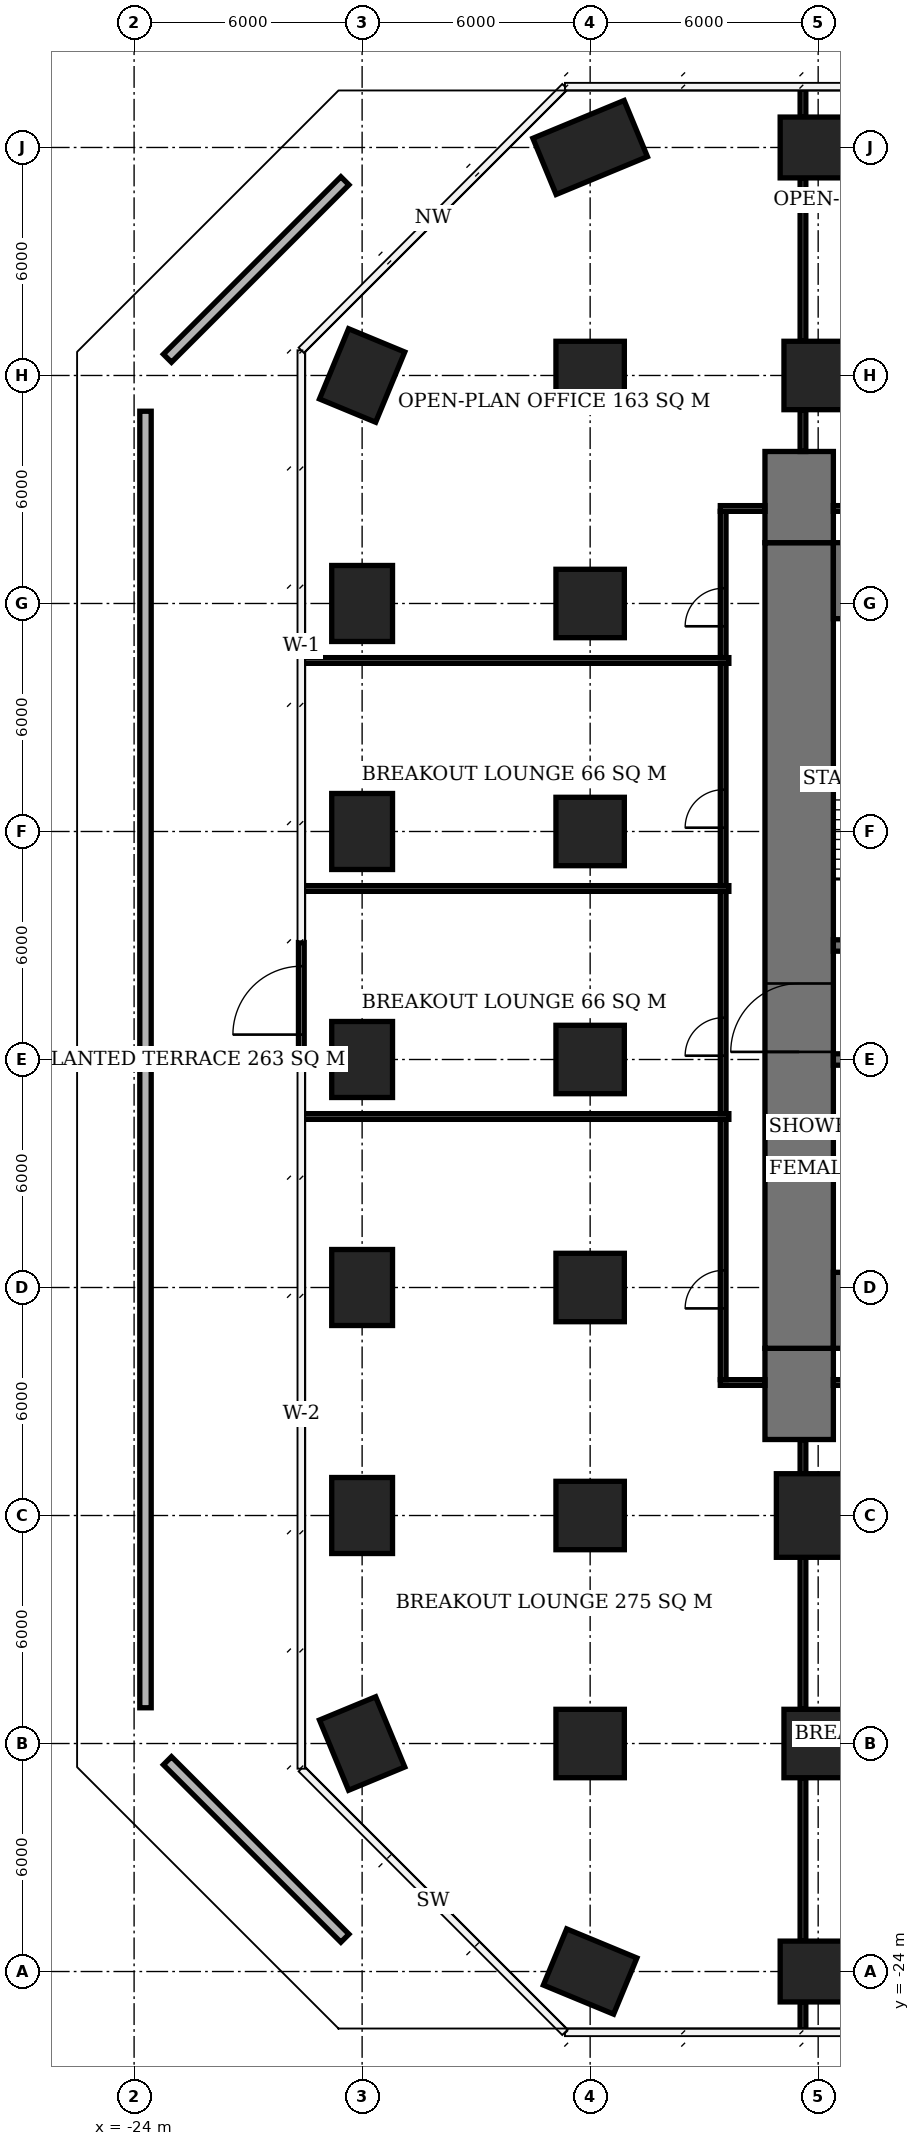
"""IFC4 building model, lengths in metres.
Left out: names, types, materials, properties, quantities, classifications, styles, units other than length and angle.
Written with IfcOpenShell. Run it as: python <this file> out.ifc"""

import sys

from ifc_helpers import new_model, si_unit, direction, frame, frame_2d, origin, origin_2d, place, context, subcontext, project, spatial, rectangle, extrude, element, fill, save


model = new_model("IFC4")
c1 = context("Model", 3, precision=1e-05, world=origin(), true_north=direction((0.0, 1.0)))
c2 = subcontext(c1, "Body", "Model", "MODEL_VIEW")
j1 = project(units=[si_unit("LENGTHUNIT", "METRE"), si_unit("PLANEANGLEUNIT", "RADIAN")], contexts=[c1])
p1 = place(None, origin())
s1 = spatial("IfcSite", under=j1, at=p1, CompositionType="ELEMENT")
p2 = place(p1, origin())
s2 = spatial("IfcBuilding", under=s1, at=p2, CompositionType="ELEMENT")
p3 = place(p2, frame((0.0, 0.0, 41.6)))
s3 = spatial("IfcBuildingStorey", under=s2, at=p3, CompositionType="ELEMENT", Elevation=41.6)
for number, where, z_axis, x_axis in (
    (1, (-18.0, -18.0, 0.0), (0.0, 0.0, 1.0), (-0.383, 0.924, 0.0)),
    (2, (-18.0, -12.0, 0.0), (0.0, 0.0, 1.0), (0.0, 1.0, 0.0)),
    (3, (-18.0, -6.0, 0.0), (0.0, 0.0, 1.0), (0.0, 1.0, 0.0)),
    (4, (-18.0, 0.0, 0.0), (0.0, 0.0, 1.0), (0.0, 1.0, 0.0)),
    (5, (-18.0, 6.0, 0.0), (0.0, 0.0, 1.0), (0.0, 1.0, 0.0)),
    (6, (-18.0, 12.0, 0.0), (0.0, 0.0, 1.0), (0.0, 1.0, 0.0)),
    (7, (-18.0, 18.0, 0.0), (0.0, 0.0, 1.0), (0.383, 0.924, 0.0)),
    (8, (-12.0, -24.0, 0.0), (0.0, 0.0, 1.0), (-0.924, 0.383, 0.0)),
):
    element("IfcColumn", number, at=place(p3, frame(where, z_axis=z_axis, x_axis=x_axis)), inside=s3, PredefinedType="COLUMN", context=c2, shape_type="SweptSolid", body=[
        extrude(rectangle(XDim=2.0, YDim=1.6, at=origin_2d()), origin(), (0.0, 0.0, 1.0), 3.9),
    ])
for number, where, z_axis, x_axis in (
    (9, (-12.0, -18.0, 0.0), (0.0, 0.0, 1.0), (1.0, 0.0, 0.0)),
    (10, (-12.0, -12.0, 0.0), (0.0, 0.0, 1.0), (1.0, 0.0, 0.0)),
    (11, (-12.0, -6.0, 0.0), (0.0, 0.0, 1.0), (1.0, 0.0, 0.0)),
    (12, (-12.0, 0.0, 0.0), (0.0, 0.0, 1.0), (1.0, 0.0, 0.0)),
    (13, (-12.0, 6.0, 0.0), (0.0, 0.0, 1.0), (1.0, 0.0, 0.0)),
    (14, (-12.0, 12.0, 0.0), (0.0, 0.0, 1.0), (1.0, 0.0, 0.0)),
    (15, (-12.0, 18.0, 0.0), (0.0, 0.0, 1.0), (1.0, 0.0, 0.0)),
):
    element("IfcColumn", number, at=place(p3, frame(where, z_axis=z_axis, x_axis=x_axis)), inside=s3, PredefinedType="COLUMN", context=c2, shape_type="SweptSolid", body=[
        extrude(rectangle(XDim=1.8, YDim=1.8, at=origin_2d()), origin(), (0.0, 0.0, 1.0), 3.9),
    ])
p4 = place(p3, frame((-12.0, 24.0, 0.0), z_axis=(0.0, 0.0, 1.0), x_axis=(0.923879532511, 0.382683432365, 0.0)))
e16 = element("IfcColumn", 16, at=p4, inside=s3, PredefinedType="COLUMN", context=c2, shape_type="SweptSolid", body=[
    extrude(rectangle(XDim=2.6, YDim=1.6, at=origin_2d()), origin(), (0.0, 0.0, 1.0), 3.9),
])
p5 = place(p3, frame((-6.0, -24.0, 0.0), z_axis=(0.0, 0.0, 1.0), x_axis=(1.0, 0.0, 0.0)))
e17 = element("IfcColumn", 17, at=p5, inside=s3, PredefinedType="COLUMN", context=c2, shape_type="SweptSolid", body=[
    extrude(rectangle(XDim=2.0, YDim=1.6, at=origin_2d()), origin(), (0.0, 0.0, 1.0), 3.9),
])
p6 = place(p3, frame((-6.0, -18.0, 0.0), z_axis=(0.0, 0.0, 1.0), x_axis=(1.0, 0.0, 0.0)))
e18 = element("IfcColumn", 18, at=p6, inside=s3, PredefinedType="COLUMN", context=c2, shape_type="SweptSolid", body=[
    extrude(rectangle(XDim=1.8, YDim=1.8, at=origin_2d()), origin(), (0.0, 0.0, 1.0), 3.9),
])
p7 = place(p3, frame((-6.0, -12.0, 0.0), z_axis=(0.0, 0.0, 1.0), x_axis=(1.0, 0.0, 0.0)))
e19 = element("IfcColumn", 19, at=p7, inside=s3, PredefinedType="COLUMN", context=c2, shape_type="SweptSolid", body=[
    extrude(rectangle(XDim=2.2, YDim=2.2, at=origin_2d()), origin(), (0.0, 0.0, 1.0), 3.9),
])
p8 = place(p3, frame((-6.0, 18.0, 0.0), z_axis=(0.0, 0.0, 1.0), x_axis=(1.0, 0.0, 0.0)))
e20 = element("IfcColumn", 20, at=p8, inside=s3, PredefinedType="COLUMN", context=c2, shape_type="SweptSolid", body=[
    extrude(rectangle(XDim=1.8, YDim=1.8, at=origin_2d()), origin(), (0.0, 0.0, 1.0), 3.9),
])
p9 = place(p3, frame((-6.0, 24.0, 0.0), z_axis=(0.0, 0.0, 1.0), x_axis=(1.0, 0.0, 0.0)))
e21 = element("IfcColumn", 21, at=p9, inside=s3, PredefinedType="COLUMN", context=c2, shape_type="SweptSolid", body=[
    extrude(rectangle(XDim=2.0, YDim=1.6, at=origin_2d()), origin(), (0.0, 0.0, 1.0), 3.9),
])
for number, where, z_axis, x_axis in (
    (22, (-5.6, -6.6, 0.0), (0.0, 0.0, 1.0), (1.0, 0.0, 0.0)),
    (23, (-5.6, 12.6, 0.0), (0.0, 0.0, 1.0), (1.0, 0.0, 0.0)),
):
    element("IfcWall", number, at=place(p3, frame(where, z_axis=z_axis, x_axis=x_axis)), inside=s3, PredefinedType="SHEAR", context=c2, shape_type="SweptSolid", body=[
        extrude(rectangle(XDim=23.2, YDim=2.0, at=frame_2d((11.6, 0.0))), origin(), (0.0, 0.0, 1.0), 3.9),
    ])
p10 = place(p3, frame((-6.5, -7.6, 0.0), z_axis=(0.0, 0.0, 1.0), x_axis=(0.0, 1.0, 0.0)))
e24 = element("IfcWall", 24, at=p10, inside=s3, PredefinedType="SHEAR", context=c2, shape_type="SweptSolid", body=[
    extrude(rectangle(XDim=21.2, YDim=1.8, at=frame_2d((10.6, 0.0))), origin(), (0.0, 0.0, 1.0), 3.9),
])
p11 = place(p10, frame((7.8, 0.0, 0.0)))
e25 = element("IfcOpeningElement", 25, at=p11, cuts=e24, PredefinedType="OPENING", context=c2, shape_type="SweptSolid", body=[
    extrude(rectangle(XDim=1.8, YDim=2.4, at=frame_2d((0.9, 1.2))), frame((0.0, 0.91, 0.0), z_axis=(0.0, -1.0, 0.0), x_axis=(1.0, 0.0, 0.0)), (0.0, 0.0, 1.0), 1.82),
])
for number, where, z_axis, x_axis in (
    (26, (-6.5, -10.0, 0.0), (0.0, 0.0, 1.0), (0.0, 1.0, 0.0)),
    (27, (-6.5, 13.6, 0.0), (0.0, 0.0, 1.0), (0.0, 1.0, 0.0)),
):
    element("IfcWall", number, at=place(p3, frame(where, z_axis=z_axis, x_axis=x_axis)), inside=s3, PredefinedType="SHEAR", context=c2, shape_type="SweptSolid", body=[
        extrude(rectangle(XDim=2.4, YDim=1.8, at=frame_2d((1.2, 0.0))), origin(), (0.0, 0.0, 1.0), 3.9),
    ])
p12 = place(p3, frame((-5.6, 0.0, 0.0), z_axis=(0.0, 0.0, 1.0), x_axis=(1.0, 0.0, 0.0)))
e28 = element("IfcWall", 28, at=p12, inside=s3, PredefinedType="SHEAR", context=c2, shape_type="SweptSolid", body=[
    extrude(rectangle(XDim=17.75, YDim=0.3, at=frame_2d((8.875, 0.0))), origin(), (0.0, 0.0, 1.0), 3.9),
])
p13 = place(p12, frame((0.6, 0.0, 0.0)))
e29 = element("IfcOpeningElement", 29, at=p13, cuts=e28, PredefinedType="OPENING", context=c2, shape_type="SweptSolid", body=[
    extrude(rectangle(XDim=0.9, YDim=2.1, at=frame_2d((0.45, 1.05))), frame((0.0, 0.16, 0.0), z_axis=(0.0, -1.0, 0.0), x_axis=(1.0, 0.0, 0.0)), (0.0, 0.0, 1.0), 0.32),
])
p14 = place(p12, frame((3.7, 0.0, 0.0)))
e30 = element("IfcOpeningElement", 30, at=p14, cuts=e28, PredefinedType="OPENING", context=c2, shape_type="SweptSolid", body=[
    extrude(rectangle(XDim=0.9, YDim=2.1, at=frame_2d((0.45, 1.05))), frame((0.0, 0.16, 0.0), z_axis=(0.0, -1.0, 0.0), x_axis=(1.0, 0.0, 0.0)), (0.0, 0.0, 1.0), 0.32),
])
p15 = place(p3, frame((-5.6, 3.0, 0.0), z_axis=(0.0, 0.0, 1.0), x_axis=(1.0, 0.0, 0.0)))
e31 = element("IfcWall", 31, at=p15, inside=s3, PredefinedType="SHEAR", context=c2, shape_type="SweptSolid", body=[
    extrude(rectangle(XDim=5.45, YDim=0.3, at=frame_2d((2.725, 0.0))), origin(), (0.0, 0.0, 1.0), 3.9),
])
p16 = place(p15, frame((0.4, 0.0, 0.0)))
e32 = element("IfcOpeningElement", 32, at=p16, cuts=e31, PredefinedType="OPENING", context=c2, shape_type="SweptSolid", body=[
    extrude(rectangle(XDim=1.2, YDim=2.1, at=frame_2d((0.6, 1.05))), frame((0.0, 0.16, 0.0), z_axis=(0.0, -1.0, 0.0), x_axis=(1.0, 0.0, 0.0)), (0.0, 0.0, 1.0), 0.32),
])
p17 = place(p15, frame((3.95, 0.0, 0.0)))
e33 = element("IfcOpeningElement", 33, at=p17, cuts=e31, PredefinedType="OPENING", context=c2, shape_type="SweptSolid", body=[
    extrude(rectangle(XDim=0.9, YDim=2.1, at=frame_2d((0.45, 1.05))), frame((0.0, 0.16, 0.0), z_axis=(0.0, -1.0, 0.0), x_axis=(1.0, 0.0, 0.0)), (0.0, 0.0, 1.0), 0.32),
])
p18 = place(p3, frame((-19.6, -0.042, 0.0), z_axis=(0.0, 0.0, 1.0), x_axis=(0.0, 1.0, 0.0)))
e34 = element("IfcWall", 34, at=p18, inside=s3, PredefinedType="USERDEFINED", context=c2, shape_type="SweptSolid", body=[
    extrude(rectangle(XDim=3.12, YDim=0.15, at=frame_2d((1.56, 0.0))), origin(), (0.0, 0.0, 1.0), 3.9),
])
p19 = place(p18, frame((0.698, 0.0, 0.0)))
e35 = element("IfcOpeningElement", 35, at=p19, cuts=e34, PredefinedType="OPENING", context=c2, shape_type="SweptSolid", body=[
    extrude(rectangle(XDim=1.8, YDim=2.4, at=frame_2d((0.9, 1.2))), frame((0.0, 0.085, 0.0), z_axis=(0.0, -1.0, 0.0), x_axis=(1.0, 0.0, 0.0)), (0.0, 0.0, 1.0), 0.17),
])
p20 = place(p3, frame((-18.453, -23.123, 0.0), z_axis=(0.0, 0.0, 1.0), x_axis=(-0.707106781187, 0.707106781187, 0.0)))
e36 = element("IfcWall", 36, at=p20, inside=s3, PredefinedType="USERDEFINED", context=c2, shape_type="SweptSolid", body=[
    extrude(rectangle(XDim=6.604, YDim=0.3, at=frame_2d((3.302, 0.0))), origin(), (0.0, 0.0, 1.0), 0.6),
])
p21 = place(p3, frame((-23.7, -17.059, 0.0), z_axis=(0.0, 0.0, 1.0), x_axis=(0.0, 1.0, 0.0)))
e37 = element("IfcWall", 37, at=p21, inside=s3, PredefinedType="USERDEFINED", context=c2, shape_type="SweptSolid", body=[
    extrude(rectangle(XDim=34.118, YDim=0.3, at=frame_2d((17.059, 0.0))), origin(), (0.0, 0.0, 1.0), 0.6),
])
p22 = place(p3, frame((-23.123, 18.453, 0.0), z_axis=(0.0, 0.0, 1.0), x_axis=(0.707106781187, 0.707106781187, 0.0)))
e38 = element("IfcWall", 38, at=p22, inside=s3, PredefinedType="USERDEFINED", context=c2, shape_type="SweptSolid", body=[
    extrude(rectangle(XDim=6.604, YDim=0.3, at=frame_2d((3.302, 0.0))), origin(), (0.0, 0.0, 1.0), 0.6),
])
for number, where, z_axis, x_axis in (
    (39, (-19.6, -1.5, 0.0), (0.0, 0.0, 1.0), (1.0, 0.0, 0.0)),
    (40, (-19.6, 4.5, 0.0), (0.0, 0.0, 1.0), (1.0, 0.0, 0.0)),
    (41, (-19.6, 10.5, 0.0), (0.0, 0.0, 1.0), (1.0, 0.0, 0.0)),
):
    element("IfcWall", number, at=place(p3, frame(where, z_axis=z_axis, x_axis=x_axis)), inside=s3, PredefinedType="PARTITIONING", context=c2, shape_type="SweptSolid", body=[
        extrude(rectangle(XDim=11.25, YDim=0.15, at=frame_2d((5.625, 0.0))), origin(), (0.0, 0.0, 1.0), 3.65),
    ])
p23 = place(p3, frame((-8.5, -8.425, 0.0), z_axis=(0.0, 0.0, 1.0), x_axis=(0.0, 1.0, 0.0)))
e42 = element("IfcWall", 42, at=p23, inside=s3, PredefinedType="PARTITIONING", context=c2, shape_type="SweptSolid", body=[
    extrude(rectangle(XDim=6.85, YDim=0.15, at=frame_2d((3.425, 0.0))), origin(), (0.0, 0.0, 1.0), 3.65),
])
p24 = place(p23, frame((1.875, 0.0, 0.0)))
e43 = element("IfcOpeningElement", 43, at=p24, cuts=e42, PredefinedType="OPENING", context=c2, shape_type="SweptSolid", body=[
    extrude(rectangle(XDim=1.0, YDim=2.1, at=frame_2d((0.5, 1.05))), frame((0.0, 0.085, 0.0), z_axis=(0.0, -1.0, 0.0), x_axis=(1.0, 0.0, 0.0)), (0.0, 0.0, 1.0), 0.17),
])
p25 = place(p3, frame((-8.575, -8.5, 0.0), z_axis=(0.0, 0.0, 1.0), x_axis=(1.0, 0.0, 0.0)))
e44 = element("IfcWall", 44, at=p25, inside=s3, PredefinedType="PARTITIONING", context=c2, shape_type="SweptSolid", body=[
    extrude(rectangle(XDim=1.175, YDim=0.15, at=frame_2d((0.587, 0.0))), origin(), (0.0, 0.0, 1.0), 3.65),
])
p26 = place(p3, frame((-8.5, -1.425, 0.0), z_axis=(0.0, 0.0, 1.0), x_axis=(0.0, 1.0, 0.0)))
e45 = element("IfcWall", 45, at=p26, inside=s3, PredefinedType="PARTITIONING", context=c2, shape_type="SweptSolid", body=[
    extrude(rectangle(XDim=5.85, YDim=0.15, at=frame_2d((2.925, 0.0))), origin(), (0.0, 0.0, 1.0), 3.65),
])
p27 = place(p26, frame((1.525, 0.0, 0.0)))
e46 = element("IfcOpeningElement", 46, at=p27, cuts=e45, PredefinedType="OPENING", context=c2, shape_type="SweptSolid", body=[
    extrude(rectangle(XDim=1.0, YDim=2.1, at=frame_2d((0.5, 1.05))), frame((0.0, 0.085, 0.0), z_axis=(0.0, -1.0, 0.0), x_axis=(1.0, 0.0, 0.0)), (0.0, 0.0, 1.0), 0.17),
])
p28 = place(p3, frame((-8.5, 4.575, 0.0), z_axis=(0.0, 0.0, 1.0), x_axis=(0.0, 1.0, 0.0)))
e47 = element("IfcWall", 47, at=p28, inside=s3, PredefinedType="PARTITIONING", context=c2, shape_type="SweptSolid", body=[
    extrude(rectangle(XDim=5.85, YDim=0.15, at=frame_2d((2.925, 0.0))), origin(), (0.0, 0.0, 1.0), 3.65),
])
p29 = place(p28, frame((1.525, 0.0, 0.0)))
e48 = element("IfcOpeningElement", 48, at=p29, cuts=e47, PredefinedType="OPENING", context=c2, shape_type="SweptSolid", body=[
    extrude(rectangle(XDim=1.0, YDim=2.1, at=frame_2d((0.5, 1.05))), frame((0.0, 0.085, 0.0), z_axis=(0.0, -1.0, 0.0), x_axis=(1.0, 0.0, 0.0)), (0.0, 0.0, 1.0), 0.17),
])
p30 = place(p3, frame((-8.5, 10.575, 0.0), z_axis=(0.0, 0.0, 1.0), x_axis=(0.0, 1.0, 0.0)))
e49 = element("IfcWall", 49, at=p30, inside=s3, PredefinedType="PARTITIONING", context=c2, shape_type="SweptSolid", body=[
    extrude(rectangle(XDim=3.85, YDim=0.15, at=frame_2d((1.925, 0.0))), origin(), (0.0, 0.0, 1.0), 3.65),
])
p31 = place(p30, frame((0.825, 0.0, 0.0)))
e50 = element("IfcOpeningElement", 50, at=p31, cuts=e49, PredefinedType="OPENING", context=c2, shape_type="SweptSolid", body=[
    extrude(rectangle(XDim=1.0, YDim=2.1, at=frame_2d((0.5, 1.05))), frame((0.0, 0.085, 0.0), z_axis=(0.0, -1.0, 0.0), x_axis=(1.0, 0.0, 0.0)), (0.0, 0.0, 1.0), 0.17),
])
p32 = place(p3, frame((-8.575, 14.5, 0.0), z_axis=(0.0, 0.0, 1.0), x_axis=(1.0, 0.0, 0.0)))
e51 = element("IfcWall", 51, at=p32, inside=s3, PredefinedType="PARTITIONING", context=c2, shape_type="SweptSolid", body=[
    extrude(rectangle(XDim=1.175, YDim=0.15, at=frame_2d((0.587, 0.0))), origin(), (0.0, 0.0, 1.0), 3.65),
])
p33 = place(p3, frame((-6.4, -25.55, 0.0), z_axis=(0.0, 0.0, 1.0), x_axis=(0.0, 1.0, 0.0)))
e52 = element("IfcWall", 52, at=p33, inside=s3, PredefinedType="PARTITIONING", context=c2, shape_type="SweptSolid", body=[
    extrude(rectangle(XDim=0.75, YDim=0.15, at=frame_2d((0.375, 0.0))), origin(), (0.0, 0.0, 1.0), 3.65),
])
p34 = place(p3, frame((-6.4, -23.2, 0.0), z_axis=(0.0, 0.0, 1.0), x_axis=(0.0, 1.0, 0.0)))
e53 = element("IfcWall", 53, at=p34, inside=s3, PredefinedType="PARTITIONING", context=c2, shape_type="SweptSolid", body=[
    extrude(rectangle(XDim=4.3, YDim=0.15, at=frame_2d((2.15, 0.0))), origin(), (0.0, 0.0, 1.0), 3.65),
])
p35 = place(p3, frame((-6.4, -17.1, 0.0), z_axis=(0.0, 0.0, 1.0), x_axis=(0.0, 1.0, 0.0)))
e54 = element("IfcWall", 54, at=p35, inside=s3, PredefinedType="PARTITIONING", context=c2, shape_type="SweptSolid", body=[
    extrude(rectangle(XDim=4.0, YDim=0.15, at=frame_2d((2.0, 0.0))), origin(), (0.0, 0.0, 1.0), 3.65),
])
p36 = place(p3, frame((-6.4, -10.9, 0.0), z_axis=(0.0, 0.0, 1.0), x_axis=(0.0, 1.0, 0.0)))
e55 = element("IfcWall", 55, at=p36, inside=s3, PredefinedType="PARTITIONING", context=c2, shape_type="SweptSolid", body=[
    extrude(rectangle(XDim=0.9, YDim=0.15, at=frame_2d((0.45, 0.0))), origin(), (0.0, 0.0, 1.0), 3.65),
])
p37 = place(p3, frame((-6.4, 16.0, 0.0), z_axis=(0.0, 0.0, 1.0), x_axis=(0.0, 1.0, 0.0)))
e56 = element("IfcWall", 56, at=p37, inside=s3, PredefinedType="PARTITIONING", context=c2, shape_type="SweptSolid", body=[
    extrude(rectangle(XDim=1.1, YDim=0.15, at=frame_2d((0.55, 0.0))), origin(), (0.0, 0.0, 1.0), 3.65),
])
p38 = place(p3, frame((-6.4, 18.9, 0.0), z_axis=(0.0, 0.0, 1.0), x_axis=(0.0, 1.0, 0.0)))
e57 = element("IfcWall", 57, at=p38, inside=s3, PredefinedType="PARTITIONING", context=c2, shape_type="SweptSolid", body=[
    extrude(rectangle(XDim=4.3, YDim=0.15, at=frame_2d((2.15, 0.0))), origin(), (0.0, 0.0, 1.0), 3.65),
])
p39 = place(p3, frame((-6.4, 24.8, 0.0), z_axis=(0.0, 0.0, 1.0), x_axis=(0.0, 1.0, 0.0)))
e58 = element("IfcWall", 58, at=p39, inside=s3, PredefinedType="PARTITIONING", context=c2, shape_type="SweptSolid", body=[
    extrude(rectangle(XDim=0.75, YDim=0.15, at=frame_2d((0.375, 0.0))), origin(), (0.0, 0.0, 1.0), 3.65),
])
p40 = place(p3, frame((1.425, -8.5, 0.0), z_axis=(0.0, 0.0, 1.0), x_axis=(-1.0, 0.0, 0.0)))
e59 = element("IfcWall", 59, at=p40, inside=s3, PredefinedType="PARTITIONING", context=c2, shape_type="SweptSolid", body=[
    extrude(rectangle(XDim=7.025, YDim=0.15, at=frame_2d((3.513, 0.0))), origin(), (0.0, 0.0, 1.0), 3.65),
])
p41 = place(p40, frame((4.04, 0.0, 0.0)))
e60 = element("IfcOpeningElement", 60, at=p41, cuts=e59, PredefinedType="OPENING", context=c2, shape_type="SweptSolid", body=[
    extrude(rectangle(XDim=1.0, YDim=2.1, at=frame_2d((0.5, 1.05))), frame((0.0, 0.085, 0.0), z_axis=(0.0, -1.0, 0.0), x_axis=(1.0, 0.0, 0.0)), (0.0, 0.0, 1.0), 0.17),
])
p42 = place(p3, frame((-5.6, 14.5, 0.0), z_axis=(0.0, 0.0, 1.0), x_axis=(1.0, 0.0, 0.0)))
e61 = element("IfcWall", 61, at=p42, inside=s3, PredefinedType="PARTITIONING", context=c2, shape_type="SweptSolid", body=[
    extrude(rectangle(XDim=10.025, YDim=0.15, at=frame_2d((5.013, 0.0))), origin(), (0.0, 0.0, 1.0), 3.65),
])
p43 = place(p42, frame((6.065, 0.0, 0.0)))
e62 = element("IfcOpeningElement", 62, at=p43, cuts=e61, PredefinedType="OPENING", context=c2, shape_type="SweptSolid", body=[
    extrude(rectangle(XDim=1.0, YDim=2.1, at=frame_2d((0.5, 1.05))), frame((0.0, 0.085, 0.0), z_axis=(0.0, -1.0, 0.0), x_axis=(1.0, 0.0, 0.0)), (0.0, 0.0, 1.0), 0.17),
])
p44 = place(p19, origin())
e63 = element("IfcDoor", 63, at=p44, inside=s3, OperationType="DOUBLE_DOOR_SINGLE_SWING", PredefinedType="DOOR", context=c2, shape_type="SweptSolid", body=[
    extrude(rectangle(XDim=1.8, YDim=2.4, at=frame_2d((0.9, 1.2))), frame((0.0, 0.025, 0.0), z_axis=(0.0, -1.0, 0.0), x_axis=(1.0, 0.0, 0.0)), (0.0, 0.0, 1.0), 0.05),
])
fill(e35, e63)
p45 = place(p11, origin())
e64 = element("IfcDoor", 64, at=p45, inside=s3, OperationType="DOUBLE_DOOR_SINGLE_SWING", PredefinedType="DOOR", context=c2, shape_type="SweptSolid", body=[
    extrude(rectangle(XDim=1.8, YDim=2.4, at=frame_2d((0.9, 1.2))), frame((0.0, 0.025, 0.0), z_axis=(0.0, -1.0, 0.0), x_axis=(1.0, 0.0, 0.0)), (0.0, 0.0, 1.0), 0.05),
])
fill(e25, e64)
p46 = place(p24, origin())
e65 = element("IfcDoor", 65, at=p46, inside=s3, OperationType="SINGLE_SWING_LEFT", PredefinedType="DOOR", context=c2, shape_type="SweptSolid", body=[
    extrude(rectangle(XDim=1.0, YDim=2.1, at=frame_2d((0.5, 1.05))), frame((0.0, 0.025, 0.0), z_axis=(0.0, -1.0, 0.0), x_axis=(1.0, 0.0, 0.0)), (0.0, 0.0, 1.0), 0.05),
])
fill(e43, e65)
p47 = place(p27, origin())
e66 = element("IfcDoor", 66, at=p47, inside=s3, OperationType="SINGLE_SWING_LEFT", PredefinedType="DOOR", context=c2, shape_type="SweptSolid", body=[
    extrude(rectangle(XDim=1.0, YDim=2.1, at=frame_2d((0.5, 1.05))), frame((0.0, 0.025, 0.0), z_axis=(0.0, -1.0, 0.0), x_axis=(1.0, 0.0, 0.0)), (0.0, 0.0, 1.0), 0.05),
])
fill(e46, e66)
p48 = place(p29, origin())
e67 = element("IfcDoor", 67, at=p48, inside=s3, OperationType="SINGLE_SWING_LEFT", PredefinedType="DOOR", context=c2, shape_type="SweptSolid", body=[
    extrude(rectangle(XDim=1.0, YDim=2.1, at=frame_2d((0.5, 1.05))), frame((0.0, 0.025, 0.0), z_axis=(0.0, -1.0, 0.0), x_axis=(1.0, 0.0, 0.0)), (0.0, 0.0, 1.0), 0.05),
])
fill(e48, e67)
p49 = place(p31, origin())
e68 = element("IfcDoor", 68, at=p49, inside=s3, OperationType="SINGLE_SWING_LEFT", PredefinedType="DOOR", context=c2, shape_type="SweptSolid", body=[
    extrude(rectangle(XDim=1.0, YDim=2.1, at=frame_2d((0.5, 1.05))), frame((0.0, 0.025, 0.0), z_axis=(0.0, -1.0, 0.0), x_axis=(1.0, 0.0, 0.0)), (0.0, 0.0, 1.0), 0.05),
])
fill(e50, e68)
save(model, sys.argv[1])
